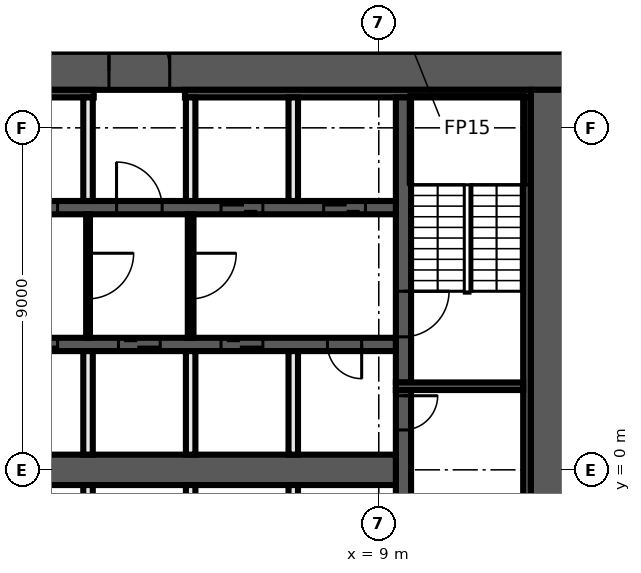
"""IFC4 building model, lengths in metres.
Left out: names, types, materials, properties, quantities, classifications, styles, units other than length and angle.
Written with IfcOpenShell. Run it as: python <this file> out.ifc"""

import sys

from ifc_helpers import new_model, si_unit, direction, frame, frame_2d, origin, place, context, subcontext, project, spatial, rectangle, extrude, element, fill, save


model = new_model("IFC4")
c1 = context("Model", 3, precision=1e-05, world=origin(), true_north=direction((0.0, 1.0)))
c2 = subcontext(c1, "Body", "Model", "MODEL_VIEW")
j1 = project(units=[si_unit("LENGTHUNIT", "METRE"), si_unit("PLANEANGLEUNIT", "RADIAN")], contexts=[c1])
p1 = place(None, origin())
s1 = spatial("IfcSite", under=j1, at=p1, CompositionType="ELEMENT")
p2 = place(p1, origin())
s2 = spatial("IfcBuilding", under=s1, at=p2, CompositionType="ELEMENT")
p3 = place(p2, frame((0.0, 0.0, 121.1)))
s3 = spatial("IfcBuildingStorey", under=s2, at=p3, CompositionType="ELEMENT", Elevation=121.1)
for number, where, z_axis, x_axis in (
    (1, (3.6, 11.0, 0.0), (0.0, 0.0, 1.0), (0.0, 1.0, 0.0)),
    (2, (1.8, 11.0, 0.0), (0.0, 0.0, 1.0), (0.0, 1.0, 0.0)),
):
    element("IfcWall", number, at=place(p3, frame(where, z_axis=z_axis, x_axis=x_axis)), inside=s3, PredefinedType="PARTITIONING", context=c2, shape_type="SweptSolid", body=[
        extrude(rectangle(XDim=1.175, YDim=0.15, at=frame_2d((0.587, 0.0))), origin(), (0.0, 0.0, 1.0), 3.3),
    ])
p4 = place(p3, frame((-14.0, 10.5, 0.0), z_axis=(0.0, 0.0, 1.0), x_axis=(1.0, 0.0, 0.0)))
e3 = element("IfcWall", 3, at=p4, inside=s3, PredefinedType="SHEAR", context=c2, shape_type="SweptSolid", body=[
    extrude(rectangle(XDim=28.0, YDim=1.0, at=frame_2d((14.0, 0.0))), origin(), (0.0, 0.0, 1.0), 3.3),
])
p5 = place(p4, frame((15.9, 0.0, 0.0)))
e4 = element("IfcOpeningElement", 4, at=p5, cuts=e3, PredefinedType="OPENING", context=c2, shape_type="SweptSolid", body=[
    extrude(rectangle(XDim=1.6, YDim=2.1, at=frame_2d((0.8, 1.05))), frame((0.0, 0.51, 0.0), z_axis=(0.0, -1.0, 0.0), x_axis=(1.0, 0.0, 0.0)), (0.0, 0.0, 1.0), 1.02),
])
p6 = place(p3, frame((13.5, 10.0, 0.0), z_axis=(0.0, 0.0, 1.0), x_axis=(0.0, -1.0, 0.0)))
e5 = element("IfcWall", 5, at=p6, inside=s3, PredefinedType="SHEAR", context=c2, shape_type="SweptSolid", body=[
    extrude(rectangle(XDim=20.0, YDim=1.0, at=frame_2d((10.0, 0.0))), origin(), (0.0, 0.0, 1.0), 3.3),
])
p7 = place(p3, frame((-13.0, 9.9, 0.0), z_axis=(0.0, 0.0, 1.0), x_axis=(1.0, 0.0, 0.0)))
e6 = element("IfcWall", 6, at=p7, inside=s3, PredefinedType="SHEAR", context=c2, shape_type="SweptSolid", body=[
    extrude(rectangle(XDim=14.5, YDim=0.2, at=frame_2d((7.25, 0.0))), origin(), (0.0, 0.0, 1.0), 3.3),
])
p8 = place(p3, frame((3.9, 9.9, 0.0), z_axis=(0.0, 0.0, 1.0), x_axis=(1.0, 0.0, 0.0)))
e7 = element("IfcWall", 7, at=p8, inside=s3, PredefinedType="SHEAR", context=c2, shape_type="SweptSolid", body=[
    extrude(rectangle(XDim=9.1, YDim=0.2, at=frame_2d((4.55, 0.0))), origin(), (0.0, 0.0, 1.0), 3.3),
])
p9 = place(p3, frame((12.9, 9.8, 0.0), z_axis=(0.0, 0.0, 1.0), x_axis=(0.0, -1.0, 0.0)))
e8 = element("IfcWall", 8, at=p9, inside=s3, PredefinedType="SHEAR", context=c2, shape_type="SweptSolid", body=[
    extrude(rectangle(XDim=19.6, YDim=0.2, at=frame_2d((9.8, 0.0))), origin(), (0.0, 0.0, 1.0), 3.3),
])
p10 = place(p3, frame((9.65, 2.1, 0.0), z_axis=(0.0, 0.0, 1.0), x_axis=(0.0, -1.0, 0.0)))
e9 = element("IfcWall", 9, at=p10, inside=s3, PredefinedType="SHEAR", context=c2, shape_type="SweptSolid", body=[
    extrude(rectangle(XDim=4.2, YDim=0.4, at=frame_2d((2.1, 0.0))), origin(), (0.0, 0.0, 1.0), 3.3),
])
p11 = place(p10, frame((0.15, 0.0, 0.0)))
e10 = element("IfcOpeningElement", 10, at=p11, cuts=e9, PredefinedType="OPENING", context=c2, shape_type="SweptSolid", body=[
    extrude(rectangle(XDim=0.9, YDim=2.1, at=frame_2d((0.45, 1.05))), frame((0.0, 0.21, 0.0), z_axis=(0.0, -1.0, 0.0), x_axis=(1.0, 0.0, 0.0)), (0.0, 0.0, 1.0), 0.42),
])
p12 = place(p3, frame((9.65, 9.8, 0.0), z_axis=(0.0, 0.0, 1.0), x_axis=(0.0, -1.0, 0.0)))
e11 = element("IfcWall", 11, at=p12, inside=s3, PredefinedType="SHEAR", context=c2, shape_type="SweptSolid", body=[
    extrude(rectangle(XDim=7.5, YDim=0.4, at=frame_2d((3.75, 0.0))), origin(), (0.0, 0.0, 1.0), 3.3),
])
p13 = place(p12, frame((5.1, 0.0, 0.0)))
e12 = element("IfcOpeningElement", 12, at=p13, cuts=e11, PredefinedType="OPENING", context=c2, shape_type="SweptSolid", body=[
    extrude(rectangle(XDim=1.2, YDim=2.1, at=frame_2d((0.6, 1.05))), frame((0.0, 0.21, 0.0), z_axis=(0.0, -1.0, 0.0), x_axis=(1.0, 0.0, 0.0)), (0.0, 0.0, 1.0), 0.42),
])
p14 = place(p3, frame((9.45, 2.2, 0.0), z_axis=(0.0, 0.0, 1.0), x_axis=(1.0, 0.0, 0.0)))
e13 = element("IfcWall", 13, at=p14, inside=s3, PredefinedType="SHEAR", context=c2, shape_type="SweptSolid", body=[
    extrude(rectangle(XDim=3.35, YDim=0.2, at=frame_2d((1.675, 0.0))), origin(), (0.0, 0.0, 1.0), 3.3),
])
p15 = place(p3, frame((-9.45, 6.9, 0.0), z_axis=(0.0, 0.0, 1.0), x_axis=(1.0, 0.0, 0.0)))
e14 = element("IfcWall", 14, at=p15, inside=s3, PredefinedType="SHEAR", context=c2, shape_type="SweptSolid", body=[
    extrude(rectangle(XDim=18.9, YDim=0.35, at=frame_2d((9.45, 0.0))), origin(), (0.0, 0.0, 1.0), 3.3),
])
p16 = place(p15, frame((0.8, 0.0, 0.0)))
e15 = element("IfcOpeningElement", 15, at=p16, cuts=e14, PredefinedType="OPENING", context=c2, shape_type="SweptSolid", body=[
    extrude(rectangle(XDim=1.1, YDim=2.1, at=frame_2d((0.55, 1.05))), frame((0.0, 0.185, 0.0), z_axis=(0.0, -1.0, 0.0), x_axis=(1.0, 0.0, 0.0)), (0.0, 0.0, 1.0), 0.37),
])
p17 = place(p15, frame((3.5, 0.0, 0.0)))
e16 = element("IfcOpeningElement", 16, at=p17, cuts=e14, PredefinedType="OPENING", context=c2, shape_type="SweptSolid", body=[
    extrude(rectangle(XDim=1.1, YDim=2.1, at=frame_2d((0.55, 1.05))), frame((0.0, 0.185, 0.0), z_axis=(0.0, -1.0, 0.0), x_axis=(1.0, 0.0, 0.0)), (0.0, 0.0, 1.0), 0.37),
])
p18 = place(p15, frame((6.2, 0.0, 0.0)))
e17 = element("IfcOpeningElement", 17, at=p18, cuts=e14, PredefinedType="OPENING", context=c2, shape_type="SweptSolid", body=[
    extrude(rectangle(XDim=1.1, YDim=2.1, at=frame_2d((0.55, 1.05))), frame((0.0, 0.185, 0.0), z_axis=(0.0, -1.0, 0.0), x_axis=(1.0, 0.0, 0.0)), (0.0, 0.0, 1.0), 0.37),
])
p19 = place(p15, frame((8.9, 0.0, 0.0)))
e18 = element("IfcOpeningElement", 18, at=p19, cuts=e14, PredefinedType="OPENING", context=c2, shape_type="SweptSolid", body=[
    extrude(rectangle(XDim=1.1, YDim=2.1, at=frame_2d((0.55, 1.05))), frame((0.0, 0.185, 0.0), z_axis=(0.0, -1.0, 0.0), x_axis=(1.0, 0.0, 0.0)), (0.0, 0.0, 1.0), 0.37),
])
p20 = place(p15, frame((11.55, 0.0, 0.0)))
e19 = element("IfcOpeningElement", 19, at=p20, cuts=e14, PredefinedType="OPENING", context=c2, shape_type="SweptSolid", body=[
    extrude(rectangle(XDim=1.2, YDim=2.1, at=frame_2d((0.6, 1.05))), frame((0.0, 0.185, 0.0), z_axis=(0.0, -1.0, 0.0), x_axis=(1.0, 0.0, 0.0)), (0.0, 0.0, 1.0), 0.37),
])
p21 = place(p15, frame((14.3, 0.0, 0.0)))
e20 = element("IfcOpeningElement", 20, at=p21, cuts=e14, PredefinedType="OPENING", context=c2, shape_type="SweptSolid", body=[
    extrude(rectangle(XDim=1.1, YDim=2.1, at=frame_2d((0.55, 1.05))), frame((0.0, 0.185, 0.0), z_axis=(0.0, -1.0, 0.0), x_axis=(1.0, 0.0, 0.0)), (0.0, 0.0, 1.0), 0.37),
])
p22 = place(p15, frame((17.0, 0.0, 0.0)))
e21 = element("IfcOpeningElement", 21, at=p22, cuts=e14, PredefinedType="OPENING", context=c2, shape_type="SweptSolid", body=[
    extrude(rectangle(XDim=1.1, YDim=2.1, at=frame_2d((0.55, 1.05))), frame((0.0, 0.185, 0.0), z_axis=(0.0, -1.0, 0.0), x_axis=(1.0, 0.0, 0.0)), (0.0, 0.0, 1.0), 0.37),
])
p23 = place(p3, frame((9.45, 3.3, 0.0), z_axis=(0.0, 0.0, 1.0), x_axis=(-1.0, 0.0, 0.0)))
e22 = element("IfcWall", 22, at=p23, inside=s3, PredefinedType="SHEAR", context=c2, shape_type="SweptSolid", body=[
    extrude(rectangle(XDim=18.9, YDim=0.35, at=frame_2d((9.45, 0.0))), origin(), (0.0, 0.0, 1.0), 3.3),
])
p24 = place(p23, frame((17.0, 0.0, 0.0)))
e23 = element("IfcOpeningElement", 23, at=p24, cuts=e22, PredefinedType="OPENING", context=c2, shape_type="SweptSolid", body=[
    extrude(rectangle(XDim=1.1, YDim=2.1, at=frame_2d((0.55, 1.05))), frame((0.0, 0.185, 0.0), z_axis=(0.0, -1.0, 0.0), x_axis=(1.0, 0.0, 0.0)), (0.0, 0.0, 1.0), 0.37),
])
p25 = place(p23, frame((14.3, 0.0, 0.0)))
e24 = element("IfcOpeningElement", 24, at=p25, cuts=e22, PredefinedType="OPENING", context=c2, shape_type="SweptSolid", body=[
    extrude(rectangle(XDim=1.1, YDim=2.1, at=frame_2d((0.55, 1.05))), frame((0.0, 0.185, 0.0), z_axis=(0.0, -1.0, 0.0), x_axis=(1.0, 0.0, 0.0)), (0.0, 0.0, 1.0), 0.37),
])
p26 = place(p23, frame((11.6, 0.0, 0.0)))
e25 = element("IfcOpeningElement", 25, at=p26, cuts=e22, PredefinedType="OPENING", context=c2, shape_type="SweptSolid", body=[
    extrude(rectangle(XDim=1.1, YDim=2.1, at=frame_2d((0.55, 1.05))), frame((0.0, 0.185, 0.0), z_axis=(0.0, -1.0, 0.0), x_axis=(1.0, 0.0, 0.0)), (0.0, 0.0, 1.0), 0.37),
])
p27 = place(p23, frame((8.9, 0.0, 0.0)))
e26 = element("IfcOpeningElement", 26, at=p27, cuts=e22, PredefinedType="OPENING", context=c2, shape_type="SweptSolid", body=[
    extrude(rectangle(XDim=1.1, YDim=2.1, at=frame_2d((0.55, 1.05))), frame((0.0, 0.185, 0.0), z_axis=(0.0, -1.0, 0.0), x_axis=(1.0, 0.0, 0.0)), (0.0, 0.0, 1.0), 0.37),
])
p28 = place(p23, frame((6.2, 0.0, 0.0)))
e27 = element("IfcOpeningElement", 27, at=p28, cuts=e22, PredefinedType="OPENING", context=c2, shape_type="SweptSolid", body=[
    extrude(rectangle(XDim=1.1, YDim=2.1, at=frame_2d((0.55, 1.05))), frame((0.0, 0.185, 0.0), z_axis=(0.0, -1.0, 0.0), x_axis=(1.0, 0.0, 0.0)), (0.0, 0.0, 1.0), 0.37),
])
p29 = place(p23, frame((3.5, 0.0, 0.0)))
e28 = element("IfcOpeningElement", 28, at=p29, cuts=e22, PredefinedType="OPENING", context=c2, shape_type="SweptSolid", body=[
    extrude(rectangle(XDim=1.1, YDim=2.1, at=frame_2d((0.55, 1.05))), frame((0.0, 0.185, 0.0), z_axis=(0.0, -1.0, 0.0), x_axis=(1.0, 0.0, 0.0)), (0.0, 0.0, 1.0), 0.37),
])
p30 = place(p23, frame((0.9, 0.0, 0.0)))
e29 = element("IfcOpeningElement", 29, at=p30, cuts=e22, PredefinedType="OPENING", context=c2, shape_type="SweptSolid", body=[
    extrude(rectangle(XDim=0.9, YDim=2.1, at=frame_2d((0.45, 1.05))), frame((0.0, 0.185, 0.0), z_axis=(0.0, -1.0, 0.0), x_axis=(1.0, 0.0, 0.0)), (0.0, 0.0, 1.0), 0.37),
])
p31 = place(p3, frame((-9.45, 0.0, 0.0), z_axis=(0.0, 0.0, 1.0), x_axis=(1.0, 0.0, 0.0)))
e30 = element("IfcWall", 30, at=p31, inside=s3, PredefinedType="SHEAR", context=c2, shape_type="SweptSolid", body=[
    extrude(rectangle(XDim=18.9, YDim=0.8, at=frame_2d((9.45, 0.0))), origin(), (0.0, 0.0, 1.0), 3.3),
])
for number, where, z_axis, x_axis in (
    (31, (6.75, -3.125, 0.0), (0.0, 0.0, 1.0), (0.0, 1.0, 0.0)),
    (32, (6.75, 0.4, 0.0), (0.0, 0.0, 1.0), (0.0, 1.0, 0.0)),
    (33, (6.75, 7.075, 0.0), (0.0, 0.0, 1.0), (0.0, 1.0, 0.0)),
):
    element("IfcWall", number, at=place(p3, frame(where, z_axis=z_axis, x_axis=x_axis)), inside=s3, PredefinedType="SOLIDWALL", context=c2, shape_type="SweptSolid", body=[
        extrude(rectangle(XDim=2.725, YDim=0.25, at=frame_2d((1.363, 0.0))), origin(), (0.0, 0.0, 1.0), 3.3),
    ])
p32 = place(p3, frame((4.05, 6.725, 0.0), z_axis=(0.0, 0.0, 1.0), x_axis=(0.0, -1.0, 0.0)))
e34 = element("IfcWall", 34, at=p32, inside=s3, PredefinedType="PARTITIONING", context=c2, shape_type="SweptSolid", body=[
    extrude(rectangle(XDim=3.25, YDim=0.15, at=frame_2d((1.625, 0.0))), origin(), (0.0, 0.0, 1.0), 3.3),
])
p33 = place(p32, frame((1.025, 0.0, 0.0)))
e35 = element("IfcOpeningElement", 35, at=p33, cuts=e34, PredefinedType="OPENING", context=c2, shape_type="SweptSolid", body=[
    extrude(rectangle(XDim=1.2, YDim=2.1, at=frame_2d((0.6, 1.05))), frame((0.0, 0.085, 0.0), z_axis=(0.0, -1.0, 0.0), x_axis=(1.0, 0.0, 0.0)), (0.0, 0.0, 1.0), 0.17),
])
for number, where, z_axis, x_axis in (
    (36, (4.05, -3.125, 0.0), (0.0, 0.0, 1.0), (0.0, 1.0, 0.0)),
    (37, (4.05, 0.4, 0.0), (0.0, 0.0, 1.0), (0.0, 1.0, 0.0)),
    (38, (4.05, 7.075, 0.0), (0.0, 0.0, 1.0), (0.0, 1.0, 0.0)),
):
    element("IfcWall", number, at=place(p3, frame(where, z_axis=z_axis, x_axis=x_axis)), inside=s3, PredefinedType="SOLIDWALL", context=c2, shape_type="SweptSolid", body=[
        extrude(rectangle(XDim=2.725, YDim=0.25, at=frame_2d((1.363, 0.0))), origin(), (0.0, 0.0, 1.0), 3.3),
    ])
p34 = place(p3, frame((1.35, 6.725, 0.0), z_axis=(0.0, 0.0, 1.0), x_axis=(0.0, -1.0, 0.0)))
e39 = element("IfcWall", 39, at=p34, inside=s3, PredefinedType="PARTITIONING", context=c2, shape_type="SweptSolid", body=[
    extrude(rectangle(XDim=3.25, YDim=0.1, at=frame_2d((1.625, 0.0))), origin(), (0.0, 0.0, 1.0), 3.3),
])
p35 = place(p34, frame((1.025, 0.0, 0.0)))
e40 = element("IfcOpeningElement", 40, at=p35, cuts=e39, PredefinedType="OPENING", context=c2, shape_type="SweptSolid", body=[
    extrude(rectangle(XDim=1.2, YDim=2.1, at=frame_2d((0.6, 1.05))), frame((0.0, 0.06, 0.0), z_axis=(0.0, -1.0, 0.0), x_axis=(1.0, 0.0, 0.0)), (0.0, 0.0, 1.0), 0.12),
])
for number, where, z_axis, x_axis in (
    (41, (1.35, -3.125, 0.0), (0.0, 0.0, 1.0), (0.0, 1.0, 0.0)),
    (42, (1.35, 0.4, 0.0), (0.0, 0.0, 1.0), (0.0, 1.0, 0.0)),
    (43, (1.35, 7.075, 0.0), (0.0, 0.0, 1.0), (0.0, 1.0, 0.0)),
):
    element("IfcWall", number, at=place(p3, frame(where, z_axis=z_axis, x_axis=x_axis)), inside=s3, PredefinedType="SOLIDWALL", context=c2, shape_type="SweptSolid", body=[
        extrude(rectangle(XDim=2.725, YDim=0.25, at=frame_2d((1.363, 0.0))), origin(), (0.0, 0.0, 1.0), 3.3),
    ])
p36 = place(p11, origin())
e44 = element("IfcDoor", 44, at=p36, inside=s3, OperationType="SINGLE_SWING_RIGHT", PredefinedType="DOOR", context=c2, shape_type="SweptSolid", body=[
    extrude(rectangle(XDim=0.9, YDim=2.1, at=frame_2d((0.45, 1.05))), frame((0.0, 0.025, 0.0), z_axis=(0.0, -1.0, 0.0), x_axis=(1.0, 0.0, 0.0)), (0.0, 0.0, 1.0), 0.05),
])
fill(e10, e44)
p37 = place(p19, origin())
e45 = element("IfcDoor", 45, at=p37, inside=s3, OperationType="DOUBLE_DOOR_SLIDING", PredefinedType="DOOR", context=c2, shape_type="SweptSolid", body=[
    extrude(rectangle(XDim=1.1, YDim=2.1, at=frame_2d((0.55, 1.05))), frame((0.0, 0.025, 0.0), z_axis=(0.0, -1.0, 0.0), x_axis=(1.0, 0.0, 0.0)), (0.0, 0.0, 1.0), 0.05),
])
fill(e18, e45)
p38 = place(p5, origin())
e46 = element("IfcDoor", 46, at=p38, inside=s3, OperationType="DOUBLE_DOOR_SINGLE_SWING", PredefinedType="DOOR", context=c2, shape_type="SweptSolid", body=[
    extrude(rectangle(XDim=1.6, YDim=2.1, at=frame_2d((0.8, 1.05))), frame((0.0, 0.025, 0.0), z_axis=(0.0, -1.0, 0.0), x_axis=(1.0, 0.0, 0.0)), (0.0, 0.0, 1.0), 0.05),
])
fill(e4, e46)
p39 = place(p20, origin())
e47 = element("IfcDoor", 47, at=p39, inside=s3, OperationType="SINGLE_SWING_LEFT", PredefinedType="DOOR", context=c2, shape_type="SweptSolid", body=[
    extrude(rectangle(XDim=1.2, YDim=2.1, at=frame_2d((0.6, 1.05))), frame((0.0, 0.025, 0.0), z_axis=(0.0, -1.0, 0.0), x_axis=(1.0, 0.0, 0.0)), (0.0, 0.0, 1.0), 0.05),
])
fill(e19, e47)
p40 = place(p21, origin())
e48 = element("IfcDoor", 48, at=p40, inside=s3, OperationType="DOUBLE_DOOR_SLIDING", PredefinedType="DOOR", context=c2, shape_type="SweptSolid", body=[
    extrude(rectangle(XDim=1.1, YDim=2.1, at=frame_2d((0.55, 1.05))), frame((0.0, 0.025, 0.0), z_axis=(0.0, -1.0, 0.0), x_axis=(1.0, 0.0, 0.0)), (0.0, 0.0, 1.0), 0.05),
])
fill(e20, e48)
p41 = place(p22, origin())
e49 = element("IfcDoor", 49, at=p41, inside=s3, OperationType="DOUBLE_DOOR_SLIDING", PredefinedType="DOOR", context=c2, shape_type="SweptSolid", body=[
    extrude(rectangle(XDim=1.1, YDim=2.1, at=frame_2d((0.55, 1.05))), frame((0.0, 0.025, 0.0), z_axis=(0.0, -1.0, 0.0), x_axis=(1.0, 0.0, 0.0)), (0.0, 0.0, 1.0), 0.05),
])
fill(e21, e49)
p42 = place(p27, origin())
e50 = element("IfcDoor", 50, at=p42, inside=s3, OperationType="DOUBLE_DOOR_SLIDING", PredefinedType="DOOR", context=c2, shape_type="SweptSolid", body=[
    extrude(rectangle(XDim=1.1, YDim=2.1, at=frame_2d((0.55, 1.05))), frame((0.0, 0.025, 0.0), z_axis=(0.0, -1.0, 0.0), x_axis=(1.0, 0.0, 0.0)), (0.0, 0.0, 1.0), 0.05),
])
fill(e26, e50)
p43 = place(p28, origin())
e51 = element("IfcDoor", 51, at=p43, inside=s3, OperationType="DOUBLE_DOOR_SLIDING", PredefinedType="DOOR", context=c2, shape_type="SweptSolid", body=[
    extrude(rectangle(XDim=1.1, YDim=2.1, at=frame_2d((0.55, 1.05))), frame((0.0, 0.025, 0.0), z_axis=(0.0, -1.0, 0.0), x_axis=(1.0, 0.0, 0.0)), (0.0, 0.0, 1.0), 0.05),
])
fill(e27, e51)
p44 = place(p29, origin())
e52 = element("IfcDoor", 52, at=p44, inside=s3, OperationType="DOUBLE_DOOR_SLIDING", PredefinedType="DOOR", context=c2, shape_type="SweptSolid", body=[
    extrude(rectangle(XDim=1.1, YDim=2.1, at=frame_2d((0.55, 1.05))), frame((0.0, 0.025, 0.0), z_axis=(0.0, -1.0, 0.0), x_axis=(1.0, 0.0, 0.0)), (0.0, 0.0, 1.0), 0.05),
])
fill(e28, e52)
p45 = place(p30, origin())
e53 = element("IfcDoor", 53, at=p45, inside=s3, OperationType="SINGLE_SWING_LEFT", PredefinedType="DOOR", context=c2, shape_type="SweptSolid", body=[
    extrude(rectangle(XDim=0.9, YDim=2.1, at=frame_2d((0.45, 1.05))), frame((0.0, 0.025, 0.0), z_axis=(0.0, -1.0, 0.0), x_axis=(1.0, 0.0, 0.0)), (0.0, 0.0, 1.0), 0.05),
])
fill(e29, e53)
p46 = place(p13, origin())
e54 = element("IfcDoor", 54, at=p46, inside=s3, OperationType="SINGLE_SWING_LEFT", PredefinedType="DOOR", context=c2, shape_type="SweptSolid", body=[
    extrude(rectangle(XDim=1.2, YDim=2.1, at=frame_2d((0.6, 1.05))), frame((0.0, 0.025, 0.0), z_axis=(0.0, -1.0, 0.0), x_axis=(1.0, 0.0, 0.0)), (0.0, 0.0, 1.0), 0.05),
])
fill(e12, e54)
p47 = place(p35, origin())
e55 = element("IfcDoor", 55, at=p47, inside=s3, OperationType="SINGLE_SWING_LEFT", PredefinedType="DOOR", context=c2, shape_type="SweptSolid", body=[
    extrude(rectangle(XDim=1.2, YDim=2.1, at=frame_2d((0.6, 1.05))), frame((0.0, 0.025, 0.0), z_axis=(0.0, -1.0, 0.0), x_axis=(1.0, 0.0, 0.0)), (0.0, 0.0, 1.0), 0.05),
])
fill(e40, e55)
p48 = place(p33, origin())
e56 = element("IfcDoor", 56, at=p48, inside=s3, OperationType="SINGLE_SWING_RIGHT", PredefinedType="DOOR", context=c2, shape_type="SweptSolid", body=[
    extrude(rectangle(XDim=1.2, YDim=2.1, at=frame_2d((0.6, 1.05))), frame((0.0, 0.025, 0.0), z_axis=(0.0, -1.0, 0.0), x_axis=(1.0, 0.0, 0.0)), (0.0, 0.0, 1.0), 0.05),
])
fill(e35, e56)
save(model, sys.argv[1])
